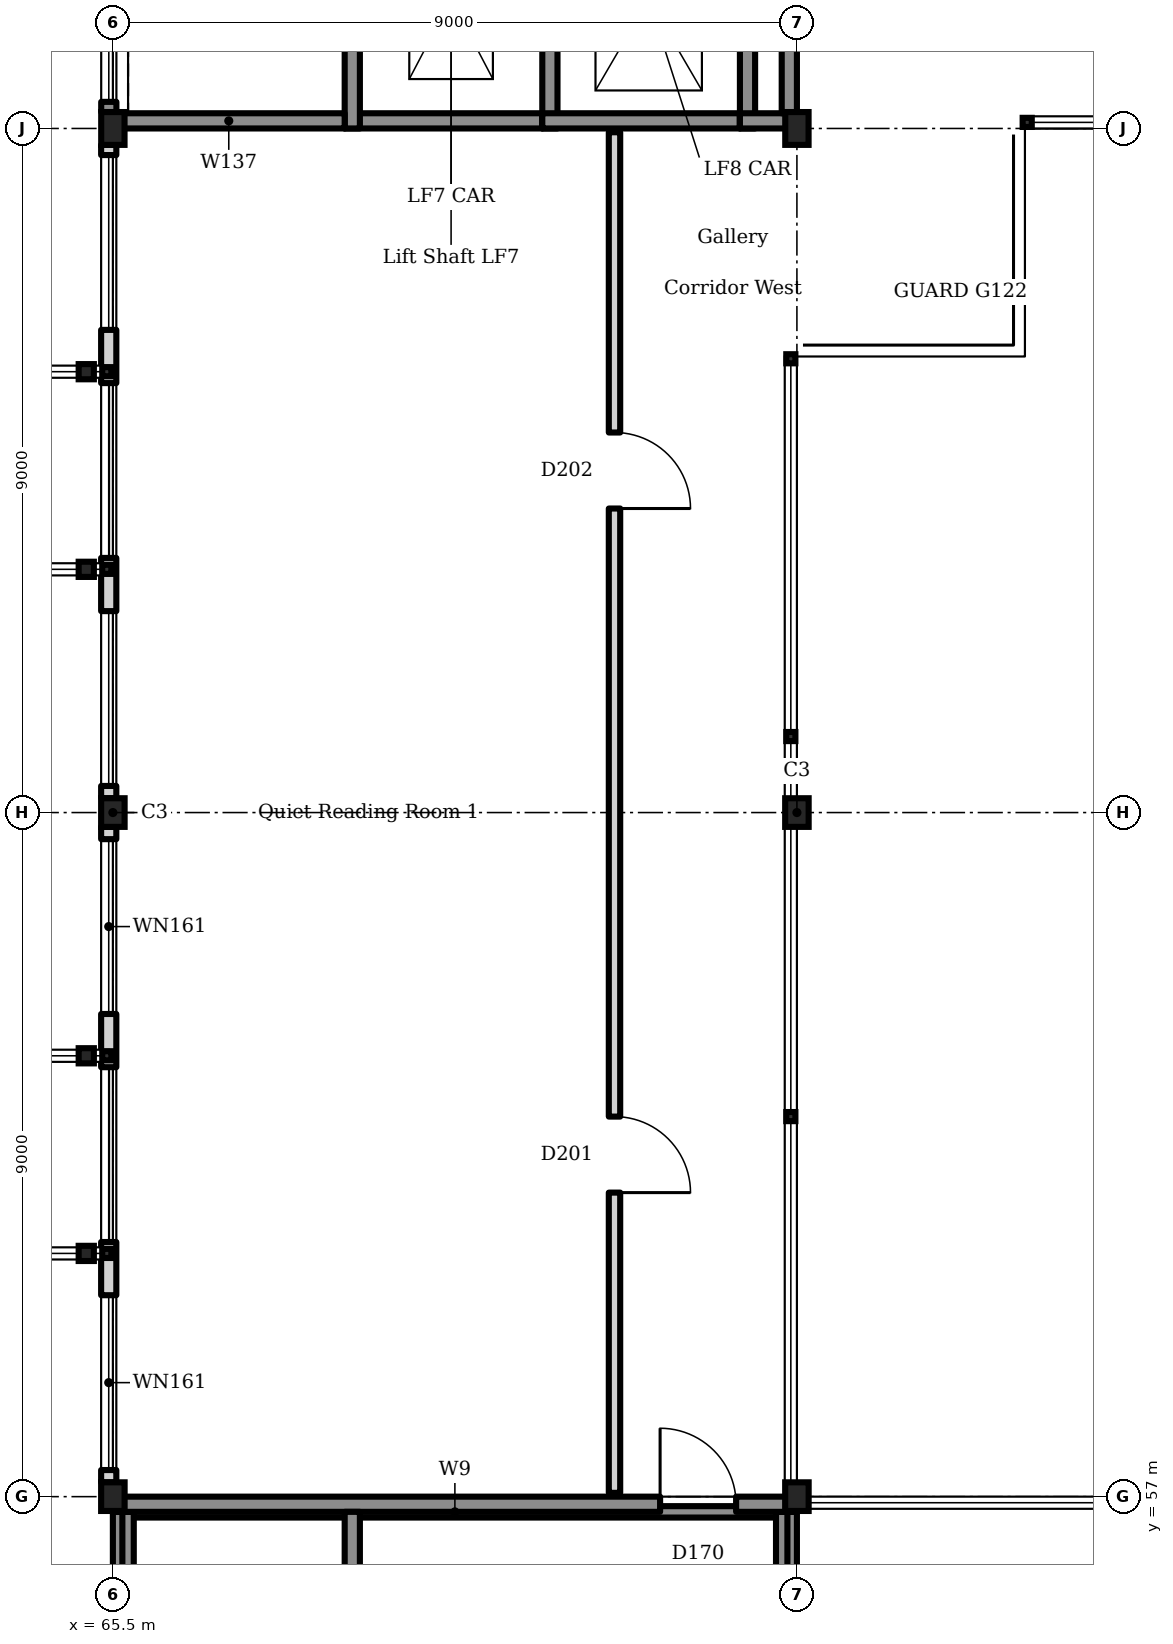
"""IFC4 building model, lengths in metres.
Left out: names, types, materials, properties, quantities, classifications, styles, units other than length and angle.
Written with IfcOpenShell. Run it as: python <this file> out.ifc"""

import sys

from ifc_helpers import new_model, si_unit, direction, frame, frame_2d, origin, origin_2d, place, context, subcontext, project, spatial, rectangle, hollow_rectangle, i_section, extrude, element, fill, save


model = new_model("IFC4")
c1 = context("Model", 3, precision=1e-05, world=origin(), true_north=direction((0.0, 1.0)))
c2 = subcontext(c1, "Body", "Model", "MODEL_VIEW")
j1 = project(units=[si_unit("LENGTHUNIT", "METRE"), si_unit("PLANEANGLEUNIT", "RADIAN")], contexts=[c1])
p1 = place(None, origin())
s1 = spatial("IfcSite", under=j1, at=p1, CompositionType="ELEMENT")
p2 = place(p1, origin())
s2 = spatial("IfcBuilding", under=s1, at=p2, CompositionType="ELEMENT")
p3 = place(p2, frame((0.0, 0.0, 9.9)))
s3 = spatial("IfcBuildingStorey", under=s2, at=p3, CompositionType="ELEMENT", Elevation=9.9)
p4 = place(p3, frame((68.55, 75.1, 0.0), z_axis=(0.0, 0.0, 1.0), x_axis=(1.0, 0.0, 0.0)))
e1 = element("IfcWall", 1, at=p4, inside=s3, PredefinedType="SOLIDWALL", context=c2, shape_type="SweptSolid", body=[
    extrude(rectangle(XDim=2.6, YDim=0.2, at=frame_2d((1.3, 0.0))), origin(), (0.0, 0.0, 1.0), 4.5),
])
for number, where, z_axis, x_axis in (
    (2, (68.65, 75.0, 0.0), (0.0, 0.0, 1.0), (0.0, 1.0, 0.0)),
    (3, (71.25, 75.0, 0.0), (0.0, 0.0, 1.0), (0.0, 1.0, 0.0)),
):
    element("IfcWall", number, at=place(p3, frame(where, z_axis=z_axis, x_axis=x_axis)), inside=s3, PredefinedType="SOLIDWALL", context=c2, shape_type="SweptSolid", body=[
        extrude(rectangle(XDim=3.4, YDim=0.2, at=frame_2d((1.7, 0.0))), origin(), (0.0, 0.0, 1.0), 4.5),
    ])
p5 = place(p3, frame((71.15, 75.1, 0.0), z_axis=(0.0, 0.0, 1.0), x_axis=(1.0, 0.0, 0.0)))
e4 = element("IfcWall", 4, at=p5, inside=s3, PredefinedType="SOLIDWALL", context=c2, shape_type="SweptSolid", body=[
    extrude(rectangle(XDim=2.6, YDim=0.2, at=frame_2d((1.3, 0.0))), origin(), (0.0, 0.0, 1.0), 4.5),
])
p6 = place(p3, frame((73.85, 75.0, 0.0), z_axis=(0.0, 0.0, 1.0), x_axis=(0.0, 1.0, 0.0)))
e5 = element("IfcWall", 5, at=p6, inside=s3, PredefinedType="SOLIDWALL", context=c2, shape_type="SweptSolid", body=[
    extrude(rectangle(XDim=3.4, YDim=0.2, at=frame_2d((1.7, 0.0))), origin(), (0.0, 0.0, 1.0), 4.5),
])
for number, where, z_axis, x_axis in (
    (6, (65.5, 57.0, 0.0), (0.0, 0.0, 1.0), (1.0, 0.0, 0.0)),
    (7, (74.5, 57.0, 0.0), (0.0, 0.0, 1.0), (1.0, 0.0, 0.0)),
    (8, (65.5, 66.0, 0.0), (0.0, 0.0, 1.0), (1.0, 0.0, 0.0)),
    (9, (74.5, 66.0, 0.0), (0.0, 0.0, 1.0), (1.0, 0.0, 0.0)),
):
    element("IfcColumn", number, at=place(p3, frame(where, z_axis=z_axis, x_axis=x_axis)), inside=s3, PredefinedType="COLUMN", context=c2, shape_type="SweptSolid", body=[
        extrude(i_section(OverallWidth=0.309, OverallDepth=0.377, WebThickness=0.021, FlangeThickness=0.04, FilletRadius=0.027, at=origin_2d()), origin(), (0.0, 0.0, 1.0), 4.5),
    ])
for number, where, z_axis, x_axis in (
    (10, (65.5, 75.0, 0.0), (0.0, 0.0, 1.0), (1.0, 0.0, 0.0)),
    (11, (74.5, 75.0, 0.0), (0.0, 0.0, 1.0), (1.0, 0.0, 0.0)),
):
    element("IfcColumn", number, at=place(p3, frame(where, z_axis=z_axis, x_axis=x_axis)), inside=s3, PredefinedType="COLUMN", context=c2, shape_type="SweptSolid", body=[
        extrude(i_section(OverallWidth=0.307, OverallDepth=0.432, WebThickness=0.021, FlangeThickness=0.04, FilletRadius=0.027, at=origin_2d()), origin(), (0.0, 0.0, 1.0), 4.5),
    ])
p7 = place(p3, frame((65.446, 57.188, 0.0), z_axis=(0.0, 0.0, 1.0), x_axis=(0.0, 1.0, 0.0)))
e12 = element("IfcWall", 12, at=p7, inside=s3, PredefinedType="SOLIDWALL", context=c2, shape_type="SweptSolid", body=[
    extrude(rectangle(XDim=8.623, YDim=0.2, at=frame_2d((4.312, 0.0))), origin(), (0.0, 0.0, 1.0), 3.75),
])
p8 = place(p7, frame((0.162, 0.0, 0.9)))
e13 = element("IfcOpeningElement", 13, at=p8, cuts=e12, PredefinedType="OPENING", context=c2, shape_type="SweptSolid", body=[
    extrude(rectangle(XDim=2.3, YDim=2.7, at=frame_2d((1.15, 1.35))), frame((0.0, 0.11, 0.0), z_axis=(0.0, -1.0, 0.0), x_axis=(1.0, 0.0, 0.0)), (0.0, 0.0, 1.0), 0.22),
])
p9 = place(p7, frame((3.162, 0.0, 0.9)))
e14 = element("IfcOpeningElement", 14, at=p9, cuts=e12, PredefinedType="OPENING", context=c2, shape_type="SweptSolid", body=[
    extrude(rectangle(XDim=2.3, YDim=2.7, at=frame_2d((1.15, 1.35))), frame((0.0, 0.11, 0.0), z_axis=(0.0, -1.0, 0.0), x_axis=(1.0, 0.0, 0.0)), (0.0, 0.0, 1.0), 0.22),
])
p10 = place(p7, frame((6.162, 0.0, 0.9)))
e15 = element("IfcOpeningElement", 15, at=p10, cuts=e12, PredefinedType="OPENING", context=c2, shape_type="SweptSolid", body=[
    extrude(rectangle(XDim=2.3, YDim=2.7, at=frame_2d((1.15, 1.35))), frame((0.0, 0.11, 0.0), z_axis=(0.0, -1.0, 0.0), x_axis=(1.0, 0.0, 0.0)), (0.0, 0.0, 1.0), 0.22),
])
p11 = place(p3, frame((65.446, 66.188, 0.0), z_axis=(0.0, 0.0, 1.0), x_axis=(0.0, 1.0, 0.0)))
e16 = element("IfcWall", 16, at=p11, inside=s3, PredefinedType="SOLIDWALL", context=c2, shape_type="SweptSolid", body=[
    extrude(rectangle(XDim=8.595, YDim=0.2, at=frame_2d((4.298, 0.0))), origin(), (0.0, 0.0, 1.0), 3.75),
])
p12 = place(p11, frame((0.162, 0.0, 0.9)))
e17 = element("IfcOpeningElement", 17, at=p12, cuts=e16, PredefinedType="OPENING", context=c2, shape_type="SweptSolid", body=[
    extrude(rectangle(XDim=2.3, YDim=2.7, at=frame_2d((1.15, 1.35))), frame((0.0, 0.11, 0.0), z_axis=(0.0, -1.0, 0.0), x_axis=(1.0, 0.0, 0.0)), (0.0, 0.0, 1.0), 0.22),
])
p13 = place(p11, frame((3.162, 0.0, 0.9)))
e18 = element("IfcOpeningElement", 18, at=p13, cuts=e16, PredefinedType="OPENING", context=c2, shape_type="SweptSolid", body=[
    extrude(rectangle(XDim=2.3, YDim=2.7, at=frame_2d((1.15, 1.35))), frame((0.0, 0.11, 0.0), z_axis=(0.0, -1.0, 0.0), x_axis=(1.0, 0.0, 0.0)), (0.0, 0.0, 1.0), 0.22),
])
p14 = place(p11, frame((6.162, 0.0, 0.9)))
e19 = element("IfcOpeningElement", 19, at=p14, cuts=e16, PredefinedType="OPENING", context=c2, shape_type="SweptSolid", body=[
    extrude(rectangle(XDim=2.3, YDim=2.7, at=frame_2d((1.15, 1.35))), frame((0.0, 0.11, 0.0), z_axis=(0.0, -1.0, 0.0), x_axis=(1.0, 0.0, 0.0)), (0.0, 0.0, 1.0), 0.22),
])
p15 = place(p3, frame((65.447, 75.216, 0.0), z_axis=(0.0, 0.0, 1.0), x_axis=(0.0, 1.0, 0.0)))
e20 = element("IfcWall", 20, at=p15, inside=s3, PredefinedType="SOLIDWALL", context=c2, shape_type="SweptSolid", body=[
    extrude(rectangle(XDim=8.418, YDim=0.2, at=frame_2d((4.209, 0.0))), origin(), (0.0, 0.0, 1.0), 4.3),
])
p16 = place(p15, frame((0.134, 0.0, 0.9)))
e21 = element("IfcOpeningElement", 21, at=p16, cuts=e20, PredefinedType="OPENING", context=c2, shape_type="SweptSolid", body=[
    extrude(rectangle(XDim=2.3, YDim=2.7, at=frame_2d((1.15, 1.35))), frame((0.0, 0.11, 0.0), z_axis=(0.0, -1.0, 0.0), x_axis=(1.0, 0.0, 0.0)), (0.0, 0.0, 1.0), 0.22),
])
p17 = place(p15, frame((3.134, 0.0, 0.9)))
e22 = element("IfcOpeningElement", 22, at=p17, cuts=e20, PredefinedType="OPENING", context=c2, shape_type="SweptSolid", body=[
    extrude(rectangle(XDim=2.3, YDim=2.7, at=frame_2d((1.15, 1.35))), frame((0.0, 0.11, 0.0), z_axis=(0.0, -1.0, 0.0), x_axis=(1.0, 0.0, 0.0)), (0.0, 0.0, 1.0), 0.22),
])
p18 = place(p3, frame((65.6, 48.2, 0.0), z_axis=(0.0, 0.0, 1.0), x_axis=(0.0, 1.0, 0.0)))
e23 = element("IfcWall", 23, at=p18, inside=s3, PredefinedType="SHEAR", context=c2, shape_type="SweptSolid", body=[
    extrude(rectangle(XDim=8.6, YDim=0.2, at=frame_2d((4.3, 0.0))), origin(), (0.0, 0.0, 1.0), 4.0),
])
p19 = place(p3, frame((74.4, 48.2, 0.0), z_axis=(0.0, 0.0, 1.0), x_axis=(0.0, 1.0, 0.0)))
e24 = element("IfcWall", 24, at=p19, inside=s3, PredefinedType="SHEAR", context=c2, shape_type="SweptSolid", body=[
    extrude(rectangle(XDim=8.6, YDim=0.2, at=frame_2d((4.3, 0.0))), origin(), (0.0, 0.0, 1.0), 4.0),
])
p20 = place(p19, frame((2.9, 0.0, 0.0)))
e25 = element("IfcOpeningElement", 25, at=p20, cuts=e24, PredefinedType="OPENING", context=c2, shape_type="SweptSolid", body=[
    extrude(rectangle(XDim=1.8, YDim=2.1, at=frame_2d((0.9, 1.05))), frame((0.0, 0.11, 0.0), z_axis=(0.0, -1.0, 0.0), x_axis=(1.0, 0.0, 0.0)), (0.0, 0.0, 1.0), 0.22),
])
for number, where, z_axis, x_axis in (
    (26, (65.7, 56.8, 4.25), (0.0, 0.0, 1.0), (1.0, 0.0, 0.0)),
    (27, (65.7, 48.2, 4.25), (0.0, 0.0, 1.0), (0.0, 1.0, 0.0)),
    (28, (74.3, 48.2, 4.25), (0.0, 0.0, 1.0), (0.0, 1.0, 0.0)),
):
    element("IfcWall", number, at=place(p3, frame(where, z_axis=z_axis, x_axis=x_axis)), inside=s3, PredefinedType="SOLIDWALL", context=c2, shape_type="SweptSolid", body=[
        extrude(rectangle(XDim=8.6, YDim=0.15, at=frame_2d((4.3, 0.0))), origin(), (0.0, 0.0, 1.0), 0.15),
    ])
p21 = place(p3, frame((65.5, 75.1, 0.0), z_axis=(0.0, 0.0, 1.0), x_axis=(1.0, 0.0, 0.0)))
e29 = element("IfcWall", 29, at=p21, inside=s3, PredefinedType="SHEAR", context=c2, shape_type="SweptSolid", body=[
    extrude(rectangle(XDim=3.05, YDim=0.2, at=frame_2d((1.525, 0.0))), origin(), (0.0, 0.0, 1.0), 4.3),
])
p22 = place(p3, frame((73.75, 75.1, 0.0), z_axis=(0.0, 0.0, 1.0), x_axis=(1.0, 0.0, 0.0)))
e30 = element("IfcWall", 30, at=p22, inside=s3, PredefinedType="SHEAR", context=c2, shape_type="SweptSolid", body=[
    extrude(rectangle(XDim=0.75, YDim=0.2, at=frame_2d((0.375, 0.0))), origin(), (0.0, 0.0, 1.0), 3.75),
])
p23 = place(p3, frame((74.4, 75.2, 0.0), z_axis=(0.0, 0.0, 1.0), x_axis=(0.0, 1.0, 0.0)))
e31 = element("IfcWall", 31, at=p23, inside=s3, PredefinedType="SHEAR", context=c2, shape_type="SweptSolid", body=[
    extrude(rectangle(XDim=8.6, YDim=0.2, at=frame_2d((4.3, 0.0))), origin(), (0.0, 0.0, 1.0), 3.75),
])
p24 = place(p23, frame((4.9, 0.0, 0.0)))
e32 = element("IfcOpeningElement", 32, at=p24, cuts=e31, PredefinedType="OPENING", context=c2, shape_type="SweptSolid", body=[
    extrude(rectangle(XDim=1.8, YDim=2.1, at=frame_2d((0.9, 1.05))), frame((0.0, 0.11, 0.0), z_axis=(0.0, -1.0, 0.0), x_axis=(1.0, 0.0, 0.0)), (0.0, 0.0, 1.0), 0.22),
])
p25 = place(p3, frame((65.5, 56.9, 0.0), z_axis=(0.0, 0.0, 1.0), x_axis=(1.0, 0.0, 0.0)))
e33 = element("IfcWall", 33, at=p25, inside=s3, PredefinedType="SHEAR", context=c2, shape_type="SweptSolid", body=[
    extrude(rectangle(XDim=9.0, YDim=0.2, at=frame_2d((4.5, 0.0))), origin(), (0.0, 0.0, 1.0), 4.0),
])
p26 = place(p25, frame((7.2, 0.0, 0.0)))
e34 = element("IfcOpeningElement", 34, at=p26, cuts=e33, PredefinedType="OPENING", context=c2, shape_type="SweptSolid", body=[
    extrude(rectangle(XDim=1.0, YDim=2.1, at=frame_2d((0.5, 1.05))), frame((0.0, 0.11, 0.0), z_axis=(0.0, -1.0, 0.0), x_axis=(1.0, 0.0, 0.0)), (0.0, 0.0, 1.0), 0.22),
])
p27 = place(p3, frame((68.65, 48.15, 0.0), z_axis=(0.0, 0.0, 1.0), x_axis=(0.0, 1.0, 0.0)))
e35 = element("IfcWall", 35, at=p27, inside=s3, PredefinedType="SHEAR", context=c2, shape_type="SweptSolid", body=[
    extrude(rectangle(XDim=8.65, YDim=0.2, at=frame_2d((4.325, 0.0))), origin(), (0.0, 0.0, 1.0), 4.0),
])
p28 = place(p27, frame((0.35, 0.0, 0.0)))
e36 = element("IfcOpeningElement", 36, at=p28, cuts=e35, PredefinedType="OPENING", context=c2, shape_type="SweptSolid", body=[
    extrude(rectangle(XDim=1.0, YDim=2.1, at=frame_2d((0.5, 1.05))), frame((0.0, 0.11, 0.0), z_axis=(0.0, -1.0, 0.0), x_axis=(1.0, 0.0, 0.0)), (0.0, 0.0, 1.0), 0.22),
])
p29 = place(p3, frame((72.1, 57.05, 0.0), z_axis=(0.0, 0.0, 1.0), x_axis=(0.0, 1.0, 0.0)))
e37 = element("IfcWall", 37, at=p29, inside=s3, PredefinedType="PARTITIONING", context=c2, shape_type="SweptSolid", body=[
    extrude(rectangle(XDim=17.9, YDim=0.15, at=frame_2d((8.95, 0.0))), origin(), (0.0, 0.0, 1.0), 3.7),
])
p30 = place(p29, frame((3.95, 0.0, 0.0)))
e38 = element("IfcOpeningElement", 38, at=p30, cuts=e37, PredefinedType="OPENING", context=c2, shape_type="SweptSolid", body=[
    extrude(rectangle(XDim=1.0, YDim=2.1, at=frame_2d((0.5, 1.05))), frame((0.0, 0.085, 0.0), z_axis=(0.0, -1.0, 0.0), x_axis=(1.0, 0.0, 0.0)), (0.0, 0.0, 1.0), 0.17),
])
p31 = place(p29, frame((12.95, 0.0, 0.0)))
e39 = element("IfcOpeningElement", 39, at=p31, cuts=e37, PredefinedType="OPENING", context=c2, shape_type="SweptSolid", body=[
    extrude(rectangle(XDim=1.0, YDim=2.1, at=frame_2d((0.5, 1.05))), frame((0.0, 0.085, 0.0), z_axis=(0.0, -1.0, 0.0), x_axis=(1.0, 0.0, 0.0)), (0.0, 0.0, 1.0), 0.17),
])
for number, where, z_axis, x_axis in (
    (40, (65.15, 60.2, 0.0), (0.0, 0.0, 1.0), (1.0, 0.0, 0.0)),
    (41, (65.15, 62.8, 0.0), (0.0, 0.0, 1.0), (1.0, 0.0, 0.0)),
    (42, (65.15, 69.2, 0.0), (0.0, 0.0, 1.0), (1.0, 0.0, 0.0)),
    (43, (65.15, 71.8, 0.0), (0.0, 0.0, 1.0), (1.0, 0.0, 0.0)),
):
    element("IfcColumn", number, at=place(p3, frame(where, z_axis=z_axis, x_axis=x_axis)), inside=s3, PredefinedType="COLUMN", context=c2, shape_type="SweptSolid", body=[
        extrude(hollow_rectangle(XDim=0.2, YDim=0.2, WallThickness=0.01, InnerFilletRadius=0.01, OuterFilletRadius=0.015, at=origin_2d()), origin(), (0.0, 0.0, 1.0), 4.5),
    ])
p32 = place(p8, origin())
e44 = element("IfcWindow", 44, at=p32, inside=s3, PartitioningType="SINGLE_PANEL", PredefinedType="WINDOW", context=c2, shape_type="SweptSolid", body=[
    extrude(rectangle(XDim=2.3, YDim=2.7, at=frame_2d((1.15, 1.35))), frame((0.0, 0.03, 0.0), z_axis=(0.0, -1.0, 0.0), x_axis=(1.0, 0.0, 0.0)), (0.0, 0.0, 1.0), 0.06),
])
fill(e13, e44)
p33 = place(p9, origin())
e45 = element("IfcWindow", 45, at=p33, inside=s3, PartitioningType="SINGLE_PANEL", PredefinedType="WINDOW", context=c2, shape_type="SweptSolid", body=[
    extrude(rectangle(XDim=2.3, YDim=2.7, at=frame_2d((1.15, 1.35))), frame((0.0, 0.03, 0.0), z_axis=(0.0, -1.0, 0.0), x_axis=(1.0, 0.0, 0.0)), (0.0, 0.0, 1.0), 0.06),
])
fill(e14, e45)
p34 = place(p10, origin())
e46 = element("IfcWindow", 46, at=p34, inside=s3, PartitioningType="SINGLE_PANEL", PredefinedType="WINDOW", context=c2, shape_type="SweptSolid", body=[
    extrude(rectangle(XDim=2.3, YDim=2.7, at=frame_2d((1.15, 1.35))), frame((0.0, 0.03, 0.0), z_axis=(0.0, -1.0, 0.0), x_axis=(1.0, 0.0, 0.0)), (0.0, 0.0, 1.0), 0.06),
])
fill(e15, e46)
p35 = place(p12, origin())
e47 = element("IfcWindow", 47, at=p35, inside=s3, PartitioningType="SINGLE_PANEL", PredefinedType="WINDOW", context=c2, shape_type="SweptSolid", body=[
    extrude(rectangle(XDim=2.3, YDim=2.7, at=frame_2d((1.15, 1.35))), frame((0.0, 0.03, 0.0), z_axis=(0.0, -1.0, 0.0), x_axis=(1.0, 0.0, 0.0)), (0.0, 0.0, 1.0), 0.06),
])
fill(e17, e47)
p36 = place(p13, origin())
e48 = element("IfcWindow", 48, at=p36, inside=s3, PartitioningType="SINGLE_PANEL", PredefinedType="WINDOW", context=c2, shape_type="SweptSolid", body=[
    extrude(rectangle(XDim=2.3, YDim=2.7, at=frame_2d((1.15, 1.35))), frame((0.0, 0.03, 0.0), z_axis=(0.0, -1.0, 0.0), x_axis=(1.0, 0.0, 0.0)), (0.0, 0.0, 1.0), 0.06),
])
fill(e18, e48)
p37 = place(p14, origin())
e49 = element("IfcWindow", 49, at=p37, inside=s3, PartitioningType="SINGLE_PANEL", PredefinedType="WINDOW", context=c2, shape_type="SweptSolid", body=[
    extrude(rectangle(XDim=2.3, YDim=2.7, at=frame_2d((1.15, 1.35))), frame((0.0, 0.03, 0.0), z_axis=(0.0, -1.0, 0.0), x_axis=(1.0, 0.0, 0.0)), (0.0, 0.0, 1.0), 0.06),
])
fill(e19, e49)
p38 = place(p16, origin())
e50 = element("IfcWindow", 50, at=p38, inside=s3, PartitioningType="SINGLE_PANEL", PredefinedType="WINDOW", context=c2, shape_type="SweptSolid", body=[
    extrude(rectangle(XDim=2.3, YDim=2.7, at=frame_2d((1.15, 1.35))), frame((0.0, 0.03, 0.0), z_axis=(0.0, -1.0, 0.0), x_axis=(1.0, 0.0, 0.0)), (0.0, 0.0, 1.0), 0.06),
])
fill(e21, e50)
p39 = place(p26, origin())
e51 = element("IfcDoor", 51, at=p39, inside=s3, OperationType="SINGLE_SWING_RIGHT", PredefinedType="DOOR", context=c2, shape_type="SweptSolid", body=[
    extrude(rectangle(XDim=1.0, YDim=2.1, at=frame_2d((0.5, 1.05))), frame((0.0, 0.025, 0.0), z_axis=(0.0, -1.0, 0.0), x_axis=(1.0, 0.0, 0.0)), (0.0, 0.0, 1.0), 0.05),
])
fill(e34, e51)
p40 = place(p30, frame((1.0, 0.0, 0.0), z_axis=(0.0, 0.0, 1.0), x_axis=(-1.0, 0.0, 0.0)))
e52 = element("IfcDoor", 52, at=p40, inside=s3, OperationType="SINGLE_SWING_LEFT", PredefinedType="DOOR", context=c2, shape_type="SweptSolid", body=[
    extrude(rectangle(XDim=1.0, YDim=2.1, at=frame_2d((0.5, 1.05))), frame((0.0, 0.025, 0.0), z_axis=(0.0, -1.0, 0.0), x_axis=(1.0, 0.0, 0.0)), (0.0, 0.0, 1.0), 0.05),
])
fill(e38, e52)
p41 = place(p31, frame((1.0, 0.0, 0.0), z_axis=(0.0, 0.0, 1.0), x_axis=(-1.0, 0.0, 0.0)))
e53 = element("IfcDoor", 53, at=p41, inside=s3, OperationType="SINGLE_SWING_LEFT", PredefinedType="DOOR", context=c2, shape_type="SweptSolid", body=[
    extrude(rectangle(XDim=1.0, YDim=2.1, at=frame_2d((0.5, 1.05))), frame((0.0, 0.025, 0.0), z_axis=(0.0, -1.0, 0.0), x_axis=(1.0, 0.0, 0.0)), (0.0, 0.0, 1.0), 0.05),
])
fill(e39, e53)
save(model, sys.argv[1])
